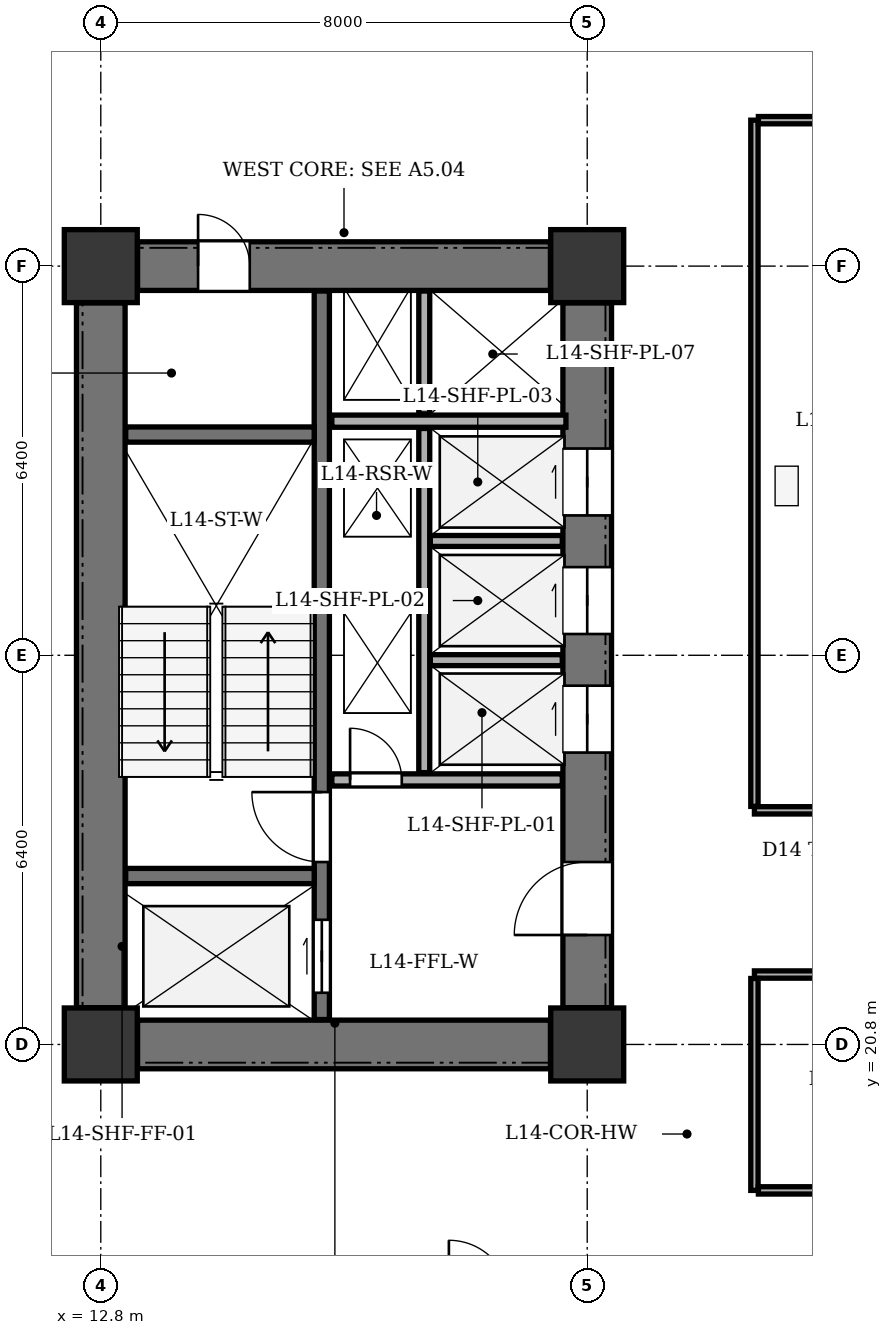
"""IFC4 building model, lengths in metres.
Left out: names, types, materials, properties, quantities, classifications, styles, units other than length and angle.
Written with IfcOpenShell. Run it as: python <this file> out.ifc"""

import sys

from ifc_helpers import new_model, si_unit, direction, frame, frame_2d, origin, origin_2d, place, context, subcontext, project, spatial, rectangle, extrude, element, fill, save


model = new_model("IFC4")
c1 = context("Model", 3, precision=1e-05, world=origin(), true_north=direction((0.0, 1.0)))
c2 = subcontext(c1, "Body", "Model", "MODEL_VIEW")
j1 = project(units=[si_unit("LENGTHUNIT", "METRE"), si_unit("PLANEANGLEUNIT", "RADIAN")], contexts=[c1])
p1 = place(None, origin())
s1 = spatial("IfcSite", under=j1, at=p1, CompositionType="ELEMENT")
p2 = place(p1, origin())
s2 = spatial("IfcBuilding", under=s1, at=p2, CompositionType="ELEMENT")
p3 = place(p2, frame((0.0, 0.0, 59.4)))
s3 = spatial("IfcBuildingStorey", under=s2, at=p3, CompositionType="ELEMENT", Elevation=59.4)
for number, where, z_axis, x_axis in (
    (1, (12.8, 20.8, 0.0), (0.0, 0.0, 1.0), (1.0, 0.0, 0.0)),
    (2, (20.8, 20.8, 0.0), (0.0, 0.0, 1.0), (1.0, 0.0, 0.0)),
    (3, (12.8, 33.6, 0.0), (0.0, 0.0, 1.0), (1.0, 0.0, 0.0)),
    (4, (20.8, 33.6, 0.0), (0.0, 0.0, 1.0), (1.0, 0.0, 0.0)),
):
    element("IfcColumn", number, at=place(p3, frame(where, z_axis=z_axis, x_axis=x_axis)), inside=s3, PredefinedType="COLUMN", context=c2, shape_type="SweptSolid", body=[
        extrude(rectangle(XDim=1.2, YDim=1.2, at=origin_2d()), origin(), (0.0, 0.0, 1.0), 3.9),
    ])
p4 = place(p3, frame((12.8, 21.405, 0.0), z_axis=(0.0, 0.0, 1.0), x_axis=(0.0, 1.0, 0.0)))
e5 = element("IfcWall", 5, at=p4, inside=s3, PredefinedType="SHEAR", context=c2, shape_type="SweptSolid", body=[
    extrude(rectangle(XDim=11.59, YDim=0.8, at=frame_2d((5.795, 0.0))), origin(), (0.0, 0.0, 1.0), 3.6),
])
p5 = place(p3, frame((13.405, 20.8, 0.0), z_axis=(0.0, 0.0, 1.0), x_axis=(1.0, 0.0, 0.0)))
e6 = element("IfcWall", 6, at=p5, inside=s3, PredefinedType="SHEAR", context=c2, shape_type="SweptSolid", body=[
    extrude(rectangle(XDim=6.79, YDim=0.8, at=frame_2d((3.395, 0.0))), origin(), (0.0, 0.0, 1.0), 3.6),
])
p6 = place(p3, frame((13.405, 33.6, 0.0), z_axis=(0.0, 0.0, 1.0), x_axis=(1.0, 0.0, 0.0)))
e7 = element("IfcWall", 7, at=p6, inside=s3, PredefinedType="SHEAR", context=c2, shape_type="SweptSolid", body=[
    extrude(rectangle(XDim=6.79, YDim=0.8, at=frame_2d((3.395, 0.0))), origin(), (0.0, 0.0, 1.0), 3.6),
])
p7 = place(p6, frame((0.995, 0.0, 0.0)))
e8 = element("IfcOpeningElement", 8, at=p7, cuts=e7, PredefinedType="OPENING", context=c2, shape_type="SweptSolid", body=[
    extrude(rectangle(XDim=0.85, YDim=2.02, at=frame_2d((0.425, 1.01))), frame((0.0, 0.41, 0.0), z_axis=(0.0, -1.0, 0.0), x_axis=(1.0, 0.0, 0.0)), (0.0, 0.0, 1.0), 0.82),
])
p8 = place(p3, frame((20.8, 21.405, 0.0), z_axis=(0.0, 0.0, 1.0), x_axis=(0.0, 1.0, 0.0)))
e9 = element("IfcWall", 9, at=p8, inside=s3, PredefinedType="SHEAR", context=c2, shape_type="SweptSolid", body=[
    extrude(rectangle(XDim=11.59, YDim=0.8, at=frame_2d((5.795, 0.0))), origin(), (0.0, 0.0, 1.0), 3.6),
])
p9 = place(p8, frame((1.195, 0.0, 0.0)))
e10 = element("IfcOpeningElement", 10, at=p9, cuts=e9, PredefinedType="OPENING", context=c2, shape_type="SweptSolid", body=[
    extrude(rectangle(XDim=1.2, YDim=2.15, at=frame_2d((0.6, 1.075))), frame((0.0, 0.41, 0.0), z_axis=(0.0, -1.0, 0.0), x_axis=(1.0, 0.0, 0.0)), (0.0, 0.0, 1.0), 0.82),
])
p10 = place(p8, frame((4.195, 0.0, 0.0)))
e11 = element("IfcOpeningElement", 11, at=p10, cuts=e9, PredefinedType="OPENING", context=c2, shape_type="SweptSolid", body=[
    extrude(rectangle(XDim=1.1, YDim=2.1, at=frame_2d((0.55, 1.05))), frame((0.0, 0.41, 0.0), z_axis=(0.0, -1.0, 0.0), x_axis=(1.0, 0.0, 0.0)), (0.0, 0.0, 1.0), 0.82),
])
p11 = place(p8, frame((6.145, 0.0, 0.0)))
e12 = element("IfcOpeningElement", 12, at=p11, cuts=e9, PredefinedType="OPENING", context=c2, shape_type="SweptSolid", body=[
    extrude(rectangle(XDim=1.1, YDim=2.1, at=frame_2d((0.55, 1.05))), frame((0.0, 0.41, 0.0), z_axis=(0.0, -1.0, 0.0), x_axis=(1.0, 0.0, 0.0)), (0.0, 0.0, 1.0), 0.82),
])
p12 = place(p8, frame((8.095, 0.0, 0.0)))
e13 = element("IfcOpeningElement", 13, at=p12, cuts=e9, PredefinedType="OPENING", context=c2, shape_type="SweptSolid", body=[
    extrude(rectangle(XDim=1.1, YDim=2.1, at=frame_2d((0.55, 1.05))), frame((0.0, 0.41, 0.0), z_axis=(0.0, -1.0, 0.0), x_axis=(1.0, 0.0, 0.0)), (0.0, 0.0, 1.0), 0.82),
])
p13 = place(p3, frame((16.435, 21.21, 0.0), z_axis=(0.0, 0.0, 1.0), x_axis=(0.0, 1.0, 0.0)))
e14 = element("IfcWall", 14, at=p13, inside=s3, PredefinedType="SHEAR", context=c2, shape_type="SweptSolid", body=[
    extrude(rectangle(XDim=11.98, YDim=0.25, at=frame_2d((5.99, 0.0))), origin(), (0.0, 0.0, 1.0), 3.6),
])
p14 = place(p13, frame((0.44, 0.0, 0.0)))
e15 = element("IfcOpeningElement", 15, at=p14, cuts=e14, PredefinedType="OPENING", context=c2, shape_type="SweptSolid", body=[
    extrude(rectangle(XDim=1.2, YDim=2.15, at=frame_2d((0.6, 1.075))), frame((0.0, 0.135, 0.0), z_axis=(0.0, -1.0, 0.0), x_axis=(1.0, 0.0, 0.0)), (0.0, 0.0, 1.0), 0.27),
])
p15 = place(p13, frame((2.59, 0.0, 0.0)))
e16 = element("IfcOpeningElement", 16, at=p15, cuts=e14, PredefinedType="OPENING", context=c2, shape_type="SweptSolid", body=[
    extrude(rectangle(XDim=1.15, YDim=2.15, at=frame_2d((0.575, 1.075))), frame((0.0, 0.135, 0.0), z_axis=(0.0, -1.0, 0.0), x_axis=(1.0, 0.0, 0.0)), (0.0, 0.0, 1.0), 0.27),
])
for number, where, z_axis, x_axis in (
    (17, (13.21, 23.57, 0.0), (0.0, 0.0, 1.0), (1.0, 0.0, 0.0)),
    (18, (13.21, 30.83, 0.0), (0.0, 0.0, 1.0), (1.0, 0.0, 0.0)),
):
    element("IfcWall", number, at=place(p3, frame(where, z_axis=z_axis, x_axis=x_axis)), inside=s3, PredefinedType="SHEAR", context=c2, shape_type="SweptSolid", body=[
        extrude(rectangle(XDim=3.1, YDim=0.25, at=frame_2d((1.55, 0.0))), origin(), (0.0, 0.0, 1.0), 3.6),
    ])
p16 = place(p3, frame((16.6, 25.15, 0.0), z_axis=(0.0, 0.0, 1.0), x_axis=(1.0, 0.0, 0.0)))
e19 = element("IfcWall", 19, at=p16, inside=s3, PredefinedType="SOLIDWALL", context=c2, shape_type="SweptSolid", body=[
    extrude(rectangle(XDim=3.79, YDim=0.2, at=frame_2d((1.895, 0.0))), origin(), (0.0, 0.0, 1.0), 3.6),
])
p17 = place(p16, frame((0.3, 0.0, 0.0)))
e20 = element("IfcOpeningElement", 20, at=p17, cuts=e19, PredefinedType="OPENING", context=c2, shape_type="SweptSolid", body=[
    extrude(rectangle(XDim=0.85, YDim=2.02, at=frame_2d((0.425, 1.01))), frame((0.0, 0.11, 0.0), z_axis=(0.0, -1.0, 0.0), x_axis=(1.0, 0.0, 0.0)), (0.0, 0.0, 1.0), 0.22),
])
p18 = place(p3, frame((16.6, 31.05, 0.0), z_axis=(0.0, 0.0, 1.0), x_axis=(1.0, 0.0, 0.0)))
e21 = element("IfcWall", 21, at=p18, inside=s3, PredefinedType="SOLIDWALL", context=c2, shape_type="SweptSolid", body=[
    extrude(rectangle(XDim=3.85, YDim=0.2, at=frame_2d((1.925, 0.0))), origin(), (0.0, 0.0, 1.0), 3.6),
])
p19 = place(p3, frame((18.12, 25.27, 0.0), z_axis=(0.0, 0.0, 1.0), x_axis=(0.0, 1.0, 0.0)))
e22 = element("IfcWall", 22, at=p19, inside=s3, PredefinedType="PARTITIONING", context=c2, shape_type="SweptSolid", body=[
    extrude(rectangle(XDim=5.66, YDim=0.18, at=frame_2d((2.83, 0.0))), origin(), (0.0, 0.0, 1.0), 3.6),
])
p20 = place(p3, frame((18.12, 31.17, 0.0), z_axis=(0.0, 0.0, 1.0), x_axis=(0.0, 1.0, 0.0)))
e23 = element("IfcWall", 23, at=p20, inside=s3, PredefinedType="PARTITIONING", context=c2, shape_type="SweptSolid", body=[
    extrude(rectangle(XDim=2.02, YDim=0.18, at=frame_2d((1.01, 0.0))), origin(), (0.0, 0.0, 1.0), 3.6),
])
for number, where, z_axis, x_axis in (
    (24, (18.22, 27.12, 0.0), (0.0, 0.0, 1.0), (1.0, 0.0, 0.0)),
    (25, (18.22, 29.08, 0.0), (0.0, 0.0, 1.0), (1.0, 0.0, 0.0)),
):
    element("IfcWall", number, at=place(p3, frame(where, z_axis=z_axis, x_axis=x_axis)), inside=s3, PredefinedType="PARTITIONING", context=c2, shape_type="SweptSolid", body=[
        extrude(rectangle(XDim=2.17, YDim=0.18, at=frame_2d((1.085, 0.0))), origin(), (0.0, 0.0, 1.0), 3.6),
    ])
p21 = place(p3, frame((23.55, 24.65, 0.0), z_axis=(0.0, 0.0, 1.0), x_axis=(1.0, 0.0, 0.0)))
e26 = element("IfcWall", 26, at=p21, inside=s3, PredefinedType="PARTITIONING", context=c2, shape_type="SweptSolid", body=[
    extrude(rectangle(XDim=8.9, YDim=0.12, at=frame_2d((4.45, 0.0))), origin(), (0.0, 0.0, 1.0), 3.135),
])
p22 = place(p21, frame((1.0, 0.0, 0.0)))
e27 = element("IfcOpeningElement", 27, at=p22, cuts=e26, PredefinedType="OPENING", context=c2, shape_type="SweptSolid", body=[
    extrude(rectangle(XDim=0.95, YDim=2.1, at=frame_2d((0.475, 1.05))), frame((0.0, 0.07, 0.0), z_axis=(0.0, -1.0, 0.0), x_axis=(1.0, 0.0, 0.0)), (0.0, 0.0, 1.0), 0.14),
])
p23 = place(p21, frame((4.1, 0.0, 0.0)))
e28 = element("IfcOpeningElement", 28, at=p23, cuts=e26, PredefinedType="OPENING", context=c2, shape_type="SweptSolid", body=[
    extrude(rectangle(XDim=0.95, YDim=2.1, at=frame_2d((0.475, 1.05))), frame((0.0, 0.07, 0.0), z_axis=(0.0, -1.0, 0.0), x_axis=(1.0, 0.0, 0.0)), (0.0, 0.0, 1.0), 0.14),
])
p24 = place(p21, frame((7.0, 0.0, 0.0)))
e29 = element("IfcOpeningElement", 29, at=p24, cuts=e26, PredefinedType="OPENING", context=c2, shape_type="SweptSolid", body=[
    extrude(rectangle(XDim=1.0, YDim=2.1, at=frame_2d((0.5, 1.05))), frame((0.0, 0.07, 0.0), z_axis=(0.0, -1.0, 0.0), x_axis=(1.0, 0.0, 0.0)), (0.0, 0.0, 1.0), 0.14),
])
p25 = place(p3, frame((23.55, 24.715, 0.0), z_axis=(0.0, 0.0, 1.0), x_axis=(0.0, 1.0, 0.0)))
e30 = element("IfcWall", 30, at=p25, inside=s3, PredefinedType="PARTITIONING", context=c2, shape_type="SweptSolid", body=[
    extrude(rectangle(XDim=11.285, YDim=0.12, at=frame_2d((5.643, 0.0))), origin(), (0.0, 0.0, 1.0), 3.6),
])
p26 = place(p3, frame((23.615, 36.0, 0.0), z_axis=(0.0, 0.0, 1.0), x_axis=(1.0, 0.0, 0.0)))
e31 = element("IfcWall", 31, at=p26, inside=s3, PredefinedType="PARTITIONING", context=c2, shape_type="SweptSolid", body=[
    extrude(rectangle(XDim=8.77, YDim=0.12, at=frame_2d((4.385, 0.0))), origin(), (0.0, 0.0, 1.0), 3.6),
])
p27 = place(p3, frame((23.55, 21.95, 0.0), z_axis=(0.0, 0.0, 1.0), x_axis=(1.0, 0.0, 0.0)))
e32 = element("IfcWall", 32, at=p27, inside=s3, PredefinedType="PARTITIONING", context=c2, shape_type="SweptSolid", body=[
    extrude(rectangle(XDim=8.9, YDim=0.12, at=frame_2d((4.45, 0.0))), origin(), (0.0, 0.0, 1.0), 3.135),
])
p28 = place(p27, frame((3.6, 0.0, 0.0)))
e33 = element("IfcOpeningElement", 33, at=p28, cuts=e32, PredefinedType="OPENING", context=c2, shape_type="SweptSolid", body=[
    extrude(rectangle(XDim=1.1, YDim=2.15, at=frame_2d((0.55, 1.075))), frame((0.0, 0.07, 0.0), z_axis=(0.0, -1.0, 0.0), x_axis=(1.0, 0.0, 0.0)), (0.0, 0.0, 1.0), 0.14),
])
p29 = place(p3, frame((23.55, 18.4, 0.0), z_axis=(0.0, 0.0, 1.0), x_axis=(0.0, 1.0, 0.0)))
e34 = element("IfcWall", 34, at=p29, inside=s3, PredefinedType="PARTITIONING", context=c2, shape_type="SweptSolid", body=[
    extrude(rectangle(XDim=3.485, YDim=0.12, at=frame_2d((1.743, 0.0))), origin(), (0.0, 0.0, 1.0), 3.6),
])
p30 = place(p3, frame((23.615, 18.4, 0.0), z_axis=(0.0, 0.0, 1.0), x_axis=(1.0, 0.0, 0.0)))
e35 = element("IfcWall", 35, at=p30, inside=s3, PredefinedType="PARTITIONING", context=c2, shape_type="SweptSolid", body=[
    extrude(rectangle(XDim=8.77, YDim=0.12, at=frame_2d((4.385, 0.0))), origin(), (0.0, 0.0, 1.0), 3.6),
])
p31 = place(p7, origin())
e36 = element("IfcDoor", 36, at=p31, inside=s3, OperationType="SINGLE_SWING_LEFT", PredefinedType="DOOR", context=c2, shape_type="SweptSolid", body=[
    extrude(rectangle(XDim=0.85, YDim=2.02, at=frame_2d((0.425, 1.01))), frame((0.0, 0.025, 0.0), z_axis=(0.0, -1.0, 0.0), x_axis=(1.0, 0.0, 0.0)), (0.0, 0.0, 1.0), 0.05),
])
fill(e8, e36)
p32 = place(p9, origin())
e37 = element("IfcDoor", 37, at=p32, inside=s3, OperationType="SINGLE_SWING_LEFT", PredefinedType="DOOR", context=c2, shape_type="SweptSolid", body=[
    extrude(rectangle(XDim=1.2, YDim=2.15, at=frame_2d((0.6, 1.075))), frame((0.0, 0.025, 0.0), z_axis=(0.0, -1.0, 0.0), x_axis=(1.0, 0.0, 0.0)), (0.0, 0.0, 1.0), 0.05),
])
fill(e10, e37)
p33 = place(p10, origin())
e38 = element("IfcDoor", 38, at=p33, inside=s3, OperationType="DOUBLE_DOOR_SLIDING", PredefinedType="DOOR", context=c2, shape_type="SweptSolid", body=[
    extrude(rectangle(XDim=1.1, YDim=2.1, at=frame_2d((0.55, 1.05))), frame((0.0, 0.025, 0.0), z_axis=(0.0, -1.0, 0.0), x_axis=(1.0, 0.0, 0.0)), (0.0, 0.0, 1.0), 0.05),
])
fill(e11, e38)
p34 = place(p11, origin())
e39 = element("IfcDoor", 39, at=p34, inside=s3, OperationType="DOUBLE_DOOR_SLIDING", PredefinedType="DOOR", context=c2, shape_type="SweptSolid", body=[
    extrude(rectangle(XDim=1.1, YDim=2.1, at=frame_2d((0.55, 1.05))), frame((0.0, 0.025, 0.0), z_axis=(0.0, -1.0, 0.0), x_axis=(1.0, 0.0, 0.0)), (0.0, 0.0, 1.0), 0.05),
])
fill(e12, e39)
p35 = place(p12, origin())
e40 = element("IfcDoor", 40, at=p35, inside=s3, OperationType="DOUBLE_DOOR_SLIDING", PredefinedType="DOOR", context=c2, shape_type="SweptSolid", body=[
    extrude(rectangle(XDim=1.1, YDim=2.1, at=frame_2d((0.55, 1.05))), frame((0.0, 0.025, 0.0), z_axis=(0.0, -1.0, 0.0), x_axis=(1.0, 0.0, 0.0)), (0.0, 0.0, 1.0), 0.05),
])
fill(e13, e40)
p36 = place(p14, origin())
e41 = element("IfcDoor", 41, at=p36, inside=s3, OperationType="DOUBLE_DOOR_SLIDING", PredefinedType="DOOR", context=c2, shape_type="SweptSolid", body=[
    extrude(rectangle(XDim=1.2, YDim=2.15, at=frame_2d((0.6, 1.075))), frame((0.0, 0.025, 0.0), z_axis=(0.0, -1.0, 0.0), x_axis=(1.0, 0.0, 0.0)), (0.0, 0.0, 1.0), 0.05),
])
fill(e15, e41)
p37 = place(p15, origin())
e42 = element("IfcDoor", 42, at=p37, inside=s3, OperationType="SINGLE_SWING_RIGHT", PredefinedType="DOOR", context=c2, shape_type="SweptSolid", body=[
    extrude(rectangle(XDim=1.15, YDim=2.15, at=frame_2d((0.575, 1.075))), frame((0.0, 0.025, 0.0), z_axis=(0.0, -1.0, 0.0), x_axis=(1.0, 0.0, 0.0)), (0.0, 0.0, 1.0), 0.05),
])
fill(e16, e42)
p38 = place(p17, origin())
e43 = element("IfcDoor", 43, at=p38, inside=s3, OperationType="SINGLE_SWING_LEFT", PredefinedType="DOOR", context=c2, shape_type="SweptSolid", body=[
    extrude(rectangle(XDim=0.85, YDim=2.02, at=frame_2d((0.425, 1.01))), frame((0.0, 0.025, 0.0), z_axis=(0.0, -1.0, 0.0), x_axis=(1.0, 0.0, 0.0)), (0.0, 0.0, 1.0), 0.05),
])
fill(e20, e43)
save(model, sys.argv[1])
